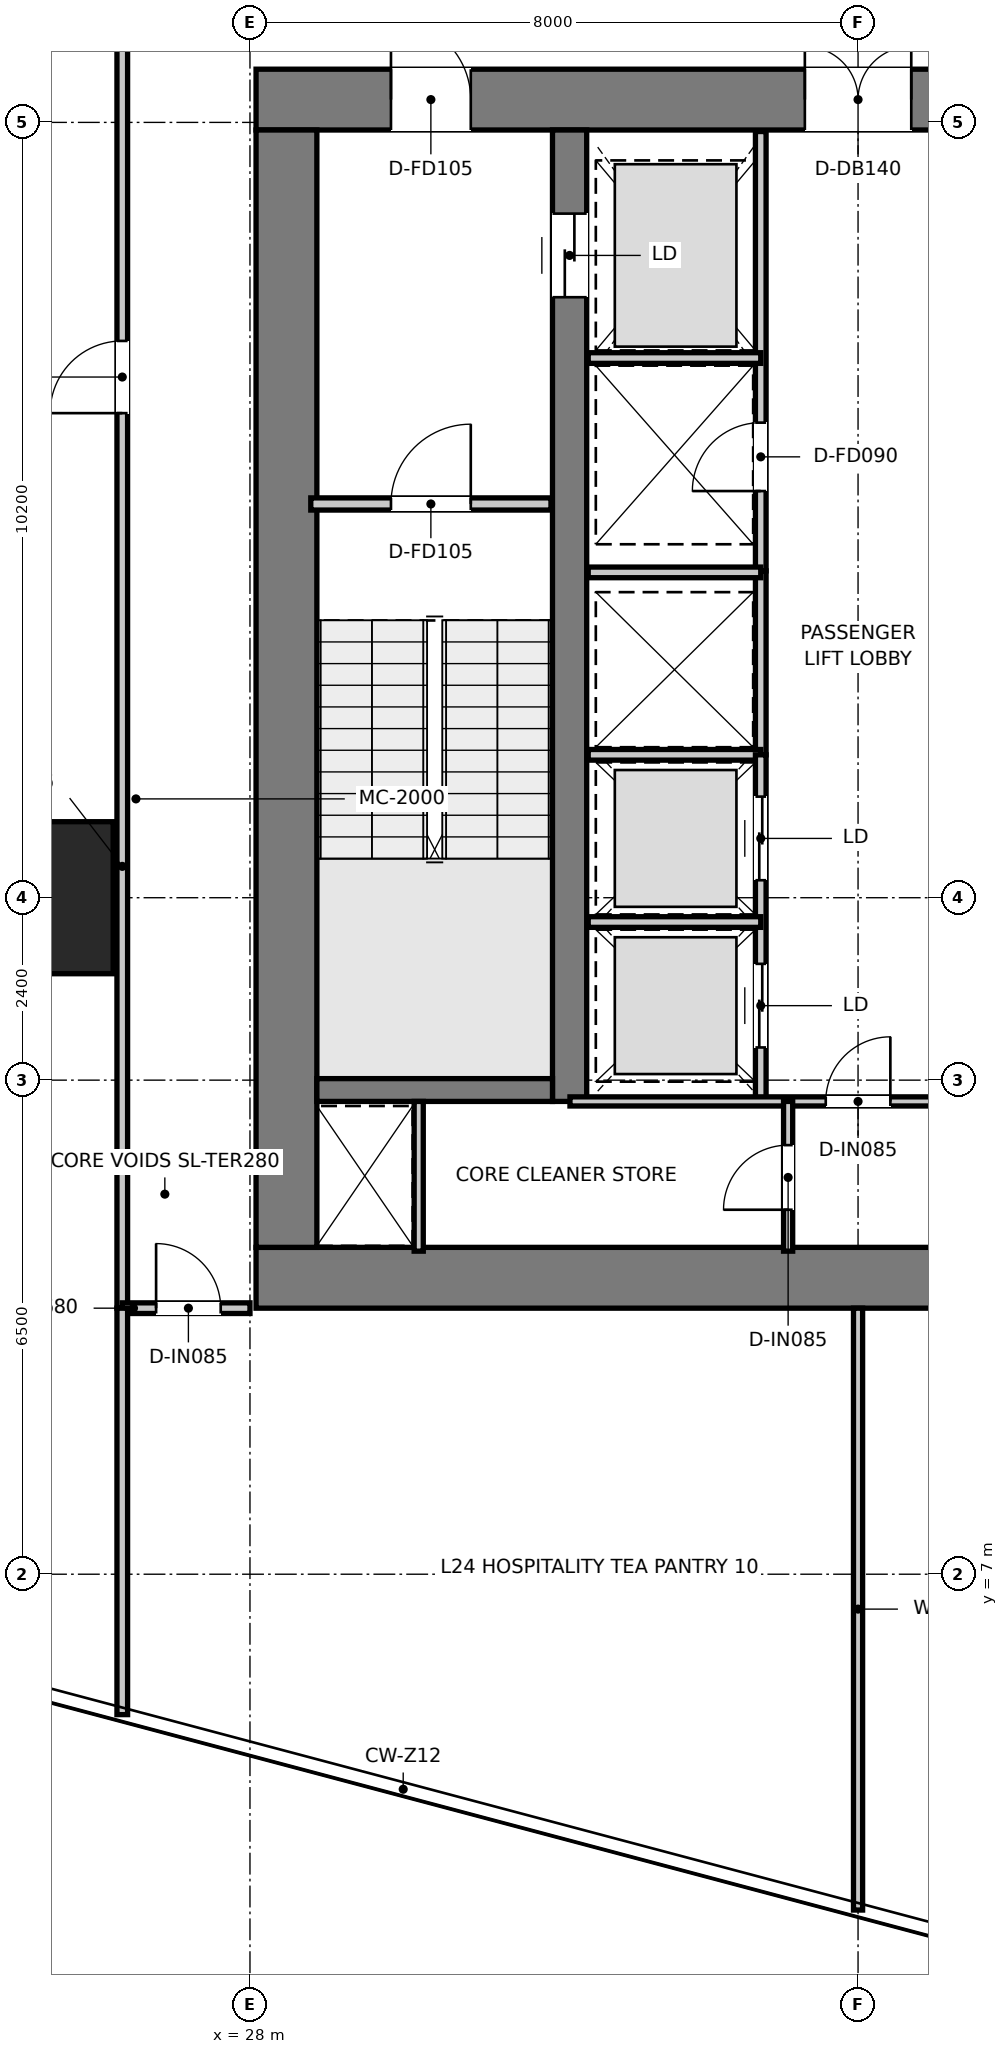
"""IFC4 building model, lengths in metres.
Left out: names, types, materials, properties, quantities, classifications, styles, units other than length and angle.
Written with IfcOpenShell. Run it as: python <this file> out.ifc"""

import sys

from ifc_helpers import new_model, si_unit, direction, frame, frame_2d, origin, origin_2d, place, context, subcontext, project, spatial, rectangle, extrude, source, transform, mapped, element, fill, save


model = new_model("IFC4")
c1 = context("Model", 3, precision=1e-05, world=origin(), true_north=direction((0.0, 1.0)))
c2 = subcontext(c1, "Body", "Model", "MODEL_VIEW")
j1 = project(units=[si_unit("LENGTHUNIT", "METRE"), si_unit("PLANEANGLEUNIT", "RADIAN")], contexts=[c1])
p1 = place(None, origin())
s1 = spatial("IfcSite", under=j1, at=p1, CompositionType="ELEMENT")
p2 = place(p1, origin())
s2 = spatial("IfcBuilding", under=s1, at=p2, CompositionType="ELEMENT")
p3 = place(p2, frame((0.0, 0.0, 101.9)))
s3 = spatial("IfcBuildingStorey", under=s2, at=p3, CompositionType="ELEMENT", Elevation=101.9)
p4 = place(p3, frame((28.08, 10.9, 0.0), z_axis=(0.0, 0.0, 1.0), x_axis=(1.0, 0.0, 0.0)))
e1 = element("IfcWall", 1, at=p4, inside=s3, PredefinedType="SHEAR", context=c2, shape_type="SweptSolid", body=[
    extrude(rectangle(XDim=15.84, YDim=0.8, at=frame_2d((7.92, 0.0))), origin(), (0.0, 0.0, 1.0), 3.95),
])
p5 = place(p3, frame((28.08, 26.4, 0.0), z_axis=(0.0, 0.0, 1.0), x_axis=(1.0, 0.0, 0.0)))
e2 = element("IfcWall", 2, at=p5, inside=s3, PredefinedType="SHEAR", context=c2, shape_type="SweptSolid", body=[
    extrude(rectangle(XDim=15.84, YDim=0.8, at=frame_2d((7.92, 0.0))), origin(), (0.0, 0.0, 1.0), 3.95),
])
p6 = place(p5, frame((7.22, 0.0, 0.0)))
e3 = element("IfcOpeningElement", 3, at=p6, cuts=e2, PredefinedType="OPENING", context=c2, shape_type="SweptSolid", body=[
    extrude(rectangle(XDim=1.4, YDim=2.2, at=frame_2d((0.7, 1.1))), frame((0.0, 0.41, 0.0), z_axis=(0.0, -1.0, 0.0), x_axis=(1.0, 0.0, 0.0)), (0.0, 0.0, 1.0), 0.82),
])
p7 = place(p5, frame((1.775, 0.0, 0.0)))
e4 = element("IfcOpeningElement", 4, at=p7, cuts=e2, PredefinedType="OPENING", context=c2, shape_type="SweptSolid", body=[
    extrude(rectangle(XDim=1.05, YDim=2.1, at=frame_2d((0.525, 1.05))), frame((0.0, 0.41, 0.0), z_axis=(0.0, -1.0, 0.0), x_axis=(1.0, 0.0, 0.0)), (0.0, 0.0, 1.0), 0.82),
])
p8 = place(p5, frame((13.015, 0.0, 0.0)))
e5 = element("IfcOpeningElement", 5, at=p8, cuts=e2, PredefinedType="OPENING", context=c2, shape_type="SweptSolid", body=[
    extrude(rectangle(XDim=1.05, YDim=2.1, at=frame_2d((0.525, 1.05))), frame((0.0, 0.41, 0.0), z_axis=(0.0, -1.0, 0.0), x_axis=(1.0, 0.0, 0.0)), (0.0, 0.0, 1.0), 0.82),
])
p9 = place(p3, frame((28.48, 11.3, 0.0), z_axis=(0.0, 0.0, 1.0), x_axis=(0.0, 1.0, 0.0)))
e6 = element("IfcWall", 6, at=p9, inside=s3, PredefinedType="SHEAR", context=c2, shape_type="SweptSolid", body=[
    extrude(rectangle(XDim=14.7, YDim=0.8, at=frame_2d((7.35, 0.0))), origin(), (0.0, 0.0, 1.0), 3.95),
])
p10 = place(p3, frame((32.205, 13.22, 0.0), z_axis=(0.0, 0.0, 1.0), x_axis=(0.0, 1.0, 0.0)))
e7 = element("IfcWall", 7, at=p10, inside=s3, PredefinedType="SHEAR", context=c2, shape_type="SweptSolid", body=[
    extrude(rectangle(XDim=12.78, YDim=0.45, at=frame_2d((6.39, 0.0))), origin(), (0.0, 0.0, 1.0), 3.95),
])
p11 = place(p10, frame((10.58, 0.0, 0.0)))
e8 = element("IfcOpeningElement", 8, at=p11, cuts=e7, PredefinedType="OPENING", context=c2, shape_type="SweptSolid", body=[
    extrude(rectangle(XDim=1.1, YDim=2.15, at=frame_2d((0.55, 1.075))), frame((0.0, 0.235, 0.0), z_axis=(0.0, -1.0, 0.0), x_axis=(1.0, 0.0, 0.0)), (0.0, 0.0, 1.0), 0.47),
])
p12 = place(p3, frame((28.88, 13.37, 0.0), z_axis=(0.0, 0.0, 1.0), x_axis=(1.0, 0.0, 0.0)))
e9 = element("IfcWall", 9, at=p12, inside=s3, PredefinedType="SHEAR", context=c2, shape_type="SweptSolid", body=[
    extrude(rectangle(XDim=3.1, YDim=0.3, at=frame_2d((1.55, 0.0))), origin(), (0.0, 0.0, 1.0), 3.95),
])
m1 = source(origin(), c2, "Body", "SweptSolid", [
    extrude(rectangle(XDim=2.0, YDim=2.0, at=origin_2d()), origin(), (0.0, 0.0, 1.0), 3.95),
])
p13 = place(p3, frame((25.2, 15.9, 0.0), z_axis=(0.0, 0.0, 1.0), x_axis=(1.0, 0.0, 0.0)))
e10 = element("IfcColumn", 10, at=p13, inside=s3, PredefinedType="USERDEFINED", context=c2, shape_type="MappedRepresentation", body=[
    mapped(m1, transform((0.0, 0.0, 0.0), x_axis=(1.0, 0.0, 0.0), y_axis=(0.0, 1.0, 0.0), z_axis=(0.0, 0.0, 1.0), scale=1.0)),
])
p14 = place(p3, frame((28.8, 21.08, 0.0), z_axis=(0.0, 0.0, 1.0), x_axis=(1.0, 0.0, 0.0)))
e11 = element("IfcWall", 11, at=p14, inside=s3, PredefinedType="PARTITIONING", context=c2, shape_type="SweptSolid", body=[
    extrude(rectangle(XDim=3.16, YDim=0.16, at=frame_2d((1.58, 0.0))), origin(), (0.0, 0.0, 1.0), 3.67),
])
p15 = place(p14, frame((1.055, 0.0, 0.0)))
e12 = element("IfcOpeningElement", 12, at=p15, cuts=e11, PredefinedType="OPENING", context=c2, shape_type="SweptSolid", body=[
    extrude(rectangle(XDim=1.05, YDim=2.1, at=frame_2d((0.525, 1.05))), frame((0.0, 0.09, 0.0), z_axis=(0.0, -1.0, 0.0), x_axis=(1.0, 0.0, 0.0)), (0.0, 0.0, 1.0), 0.18),
])
p16 = place(p3, frame((34.72, 20.2, 0.0), z_axis=(0.0, 0.0, 1.0), x_axis=(0.0, 1.0, 0.0)))
e13 = element("IfcWall", 13, at=p16, inside=s3, PredefinedType="PARTITIONING", context=c2, shape_type="SweptSolid", body=[
    extrude(rectangle(XDim=5.78, YDim=0.14, at=frame_2d((2.89, 0.0))), origin(), (0.0, 0.0, 1.0), 2.67),
])
p17 = place(p16, frame((1.05, 0.0, 0.0)))
e14 = element("IfcOpeningElement", 14, at=p17, cuts=e13, PredefinedType="OPENING", context=c2, shape_type="SweptSolid", body=[
    extrude(rectangle(XDim=0.9, YDim=2.1, at=frame_2d((0.45, 1.05))), frame((0.0, 0.08, 0.0), z_axis=(0.0, -1.0, 0.0), x_axis=(1.0, 0.0, 0.0)), (0.0, 0.0, 1.0), 0.16),
])
p18 = place(p3, frame((32.45, 23.0, 0.0), z_axis=(0.0, 0.0, 1.0), x_axis=(1.0, 0.0, 0.0)))
e15 = element("IfcWall", 15, at=p18, inside=s3, PredefinedType="PARTITIONING", context=c2, shape_type="SweptSolid", body=[
    extrude(rectangle(XDim=2.27, YDim=0.14, at=frame_2d((1.135, 0.0))), origin(), (0.0, 0.0, 1.0), 2.67),
])
p19 = place(p3, frame((34.72, 17.78, 0.0), z_axis=(0.0, 0.0, 1.0), x_axis=(0.0, 1.0, 0.0)))
e16 = element("IfcWall", 16, at=p19, inside=s3, PredefinedType="PARTITIONING", context=c2, shape_type="SweptSolid", body=[
    extrude(rectangle(XDim=2.42, YDim=0.14, at=frame_2d((1.21, 0.0))), origin(), (0.0, 0.0, 1.0), 3.67),
])
for number, where, z_axis, x_axis in (
    (17, (32.45, 17.78, 0.0), (0.0, 0.0, 1.0), (1.0, 0.0, 0.0)),
    (18, (32.45, 20.18, 0.0), (0.0, 0.0, 1.0), (1.0, 0.0, 0.0)),
):
    element("IfcWall", number, at=place(p3, frame(where, z_axis=z_axis, x_axis=x_axis)), inside=s3, PredefinedType="PARTITIONING", context=c2, shape_type="SweptSolid", body=[
        extrude(rectangle(XDim=2.27, YDim=0.14, at=frame_2d((1.135, 0.0))), origin(), (0.0, 0.0, 1.0), 3.67),
    ])
p20 = place(p3, frame((34.72, 13.22, 0.0), z_axis=(0.0, 0.0, 1.0), x_axis=(0.0, 1.0, 0.0)))
e19 = element("IfcWall", 19, at=p20, inside=s3, PredefinedType="PARTITIONING", context=c2, shape_type="SweptSolid", body=[
    extrude(rectangle(XDim=4.56, YDim=0.14, at=frame_2d((2.28, 0.0))), origin(), (0.0, 0.0, 1.0), 3.67),
])
p21 = place(p20, frame((0.71, 0.0, 0.0)))
e20 = element("IfcOpeningElement", 20, at=p21, cuts=e19, PredefinedType="OPENING", context=c2, shape_type="SweptSolid", body=[
    extrude(rectangle(XDim=1.1, YDim=2.15, at=frame_2d((0.55, 1.075))), frame((0.0, 0.08, 0.0), z_axis=(0.0, -1.0, 0.0), x_axis=(1.0, 0.0, 0.0)), (0.0, 0.0, 1.0), 0.16),
])
p22 = place(p20, frame((2.91, 0.0, 0.0)))
e21 = element("IfcOpeningElement", 21, at=p22, cuts=e19, PredefinedType="OPENING", context=c2, shape_type="SweptSolid", body=[
    extrude(rectangle(XDim=1.1, YDim=2.15, at=frame_2d((0.55, 1.075))), frame((0.0, 0.08, 0.0), z_axis=(0.0, -1.0, 0.0), x_axis=(1.0, 0.0, 0.0)), (0.0, 0.0, 1.0), 0.16),
])
p23 = place(p3, frame((32.45, 15.58, 0.0), z_axis=(0.0, 0.0, 1.0), x_axis=(1.0, 0.0, 0.0)))
e22 = element("IfcWall", 22, at=p23, inside=s3, PredefinedType="PARTITIONING", context=c2, shape_type="SweptSolid", body=[
    extrude(rectangle(XDim=2.27, YDim=0.14, at=frame_2d((1.135, 0.0))), origin(), (0.0, 0.0, 1.0), 3.67),
])
p24 = place(p3, frame((30.22, 11.25, 0.0), z_axis=(0.0, 0.0, 1.0), x_axis=(0.0, 1.0, 0.0)))
e23 = element("IfcWall", 23, at=p24, inside=s3, PredefinedType="PARTITIONING", context=c2, shape_type="SweptSolid", body=[
    extrude(rectangle(XDim=1.97, YDim=0.12, at=frame_2d((0.985, 0.0))), origin(), (0.0, 0.0, 1.0), 3.67),
])
p25 = place(p3, frame((32.21, 13.22, 0.0), z_axis=(0.0, 0.0, 1.0), x_axis=(1.0, 0.0, 0.0)))
e24 = element("IfcWall", 24, at=p25, inside=s3, PredefinedType="PARTITIONING", context=c2, shape_type="SweptSolid", body=[
    extrude(rectangle(XDim=7.58, YDim=0.12, at=frame_2d((3.79, 0.0))), origin(), (0.0, 0.0, 1.0), 3.67),
])
p26 = place(p25, frame((3.365, 0.0, 0.0)))
e25 = element("IfcOpeningElement", 25, at=p26, cuts=e24, PredefinedType="OPENING", context=c2, shape_type="SweptSolid", body=[
    extrude(rectangle(XDim=0.85, YDim=2.1, at=frame_2d((0.425, 1.05))), frame((0.0, 0.07, 0.0), z_axis=(0.0, -1.0, 0.0), x_axis=(1.0, 0.0, 0.0)), (0.0, 0.0, 1.0), 0.14),
])
p27 = place(p3, frame((35.08, 11.25, 0.0), z_axis=(0.0, 0.0, 1.0), x_axis=(0.0, 1.0, 0.0)))
e26 = element("IfcWall", 26, at=p27, inside=s3, PredefinedType="PARTITIONING", context=c2, shape_type="SweptSolid", body=[
    extrude(rectangle(XDim=1.97, YDim=0.12, at=frame_2d((0.985, 0.0))), origin(), (0.0, 0.0, 1.0), 3.67),
])
p28 = place(p27, frame((0.545, 0.0, 0.0)))
e27 = element("IfcOpeningElement", 27, at=p28, cuts=e26, PredefinedType="OPENING", context=c2, shape_type="SweptSolid", body=[
    extrude(rectangle(XDim=0.85, YDim=2.1, at=frame_2d((0.425, 1.05))), frame((0.0, 0.07, 0.0), z_axis=(0.0, -1.0, 0.0), x_axis=(1.0, 0.0, 0.0)), (0.0, 0.0, 1.0), 0.14),
])
p29 = place(p3, frame((26.32, 10.5, 0.0), z_axis=(0.0, 0.0, 1.0), x_axis=(0.0, 1.0, 0.0)))
e28 = element("IfcWall", 28, at=p29, inside=s3, PredefinedType="PARTITIONING", context=c2, shape_type="SweptSolid", body=[
    extrude(rectangle(XDim=25.62, YDim=0.14, at=frame_2d((12.81, 0.0))), origin(), (0.0, 0.0, 1.0), 2.97),
])
p30 = place(p29, frame((11.775, 0.0, 0.0)))
e29 = element("IfcOpeningElement", 29, at=p30, cuts=e28, PredefinedType="OPENING", context=c2, shape_type="SweptSolid", body=[
    extrude(rectangle(XDim=0.95, YDim=2.1, at=frame_2d((0.475, 1.05))), frame((0.0, 0.08, 0.0), z_axis=(0.0, -1.0, 0.0), x_axis=(1.0, 0.0, 0.0)), (0.0, 0.0, 1.0), 0.16),
])
p31 = place(p29, frame((20.375, 0.0, 0.0)))
e30 = element("IfcOpeningElement", 30, at=p31, cuts=e28, PredefinedType="OPENING", context=c2, shape_type="SweptSolid", body=[
    extrude(rectangle(XDim=0.95, YDim=2.1, at=frame_2d((0.475, 1.05))), frame((0.0, 0.08, 0.0), z_axis=(0.0, -1.0, 0.0), x_axis=(1.0, 0.0, 0.0)), (0.0, 0.0, 1.0), 0.16),
])
p32 = place(p3, frame((26.32, 10.5, 0.0), z_axis=(0.0, 0.0, 1.0), x_axis=(1.0, 0.0, 0.0)))
e31 = element("IfcWall", 31, at=p32, inside=s3, PredefinedType="PARTITIONING", context=c2, shape_type="SweptSolid", body=[
    extrude(rectangle(XDim=1.68, YDim=0.14, at=frame_2d((0.84, 0.0))), origin(), (0.0, 0.0, 1.0), 3.67),
])
p33 = place(p32, frame((0.445, 0.0, 0.0)))
e32 = element("IfcOpeningElement", 32, at=p33, cuts=e31, PredefinedType="OPENING", context=c2, shape_type="SweptSolid", body=[
    extrude(rectangle(XDim=0.85, YDim=2.1, at=frame_2d((0.425, 1.05))), frame((0.0, 0.08, 0.0), z_axis=(0.0, -1.0, 0.0), x_axis=(1.0, 0.0, 0.0)), (0.0, 0.0, 1.0), 0.16),
])
p34 = place(p3, frame((26.32, 5.153, 0.0), z_axis=(0.0, 0.0, 1.0), x_axis=(0.0, 1.0, 0.0)))
e33 = element("IfcWall", 33, at=p34, inside=s3, PredefinedType="PARTITIONING", context=c2, shape_type="SweptSolid", body=[
    extrude(rectangle(XDim=5.347, YDim=0.14, at=frame_2d((2.674, 0.0))), origin(), (0.0, 0.0, 1.0), 3.67),
])
p35 = place(p3, frame((36.0, 2.582, 0.0), z_axis=(0.0, 0.0, 1.0), x_axis=(0.0, 1.0, 0.0)))
e34 = element("IfcWall", 34, at=p35, inside=s3, PredefinedType="PARTITIONING", context=c2, shape_type="SweptSolid", body=[
    extrude(rectangle(XDim=7.918, YDim=0.12, at=frame_2d((3.959, 0.0))), origin(), (0.0, 0.0, 1.0), 3.67),
])
p36 = place(p15, origin())
e35 = element("IfcDoor", 35, at=p36, inside=s3, OperationType="SINGLE_SWING_RIGHT", PredefinedType="DOOR", context=c2, shape_type="SweptSolid", body=[
    extrude(rectangle(XDim=1.05, YDim=2.1, at=frame_2d((0.525, 1.05))), frame((0.0, 0.025, 0.0), z_axis=(0.0, -1.0, 0.0), x_axis=(1.0, 0.0, 0.0)), (0.0, 0.0, 1.0), 0.05),
])
fill(e12, e35)
p37 = place(p6, origin())
e36 = element("IfcDoor", 36, at=p37, inside=s3, OperationType="DOUBLE_DOOR_SINGLE_SWING", PredefinedType="DOOR", context=c2, shape_type="SweptSolid", body=[
    extrude(rectangle(XDim=1.4, YDim=2.2, at=frame_2d((0.7, 1.1))), frame((0.0, 0.025, 0.0), z_axis=(0.0, -1.0, 0.0), x_axis=(1.0, 0.0, 0.0)), (0.0, 0.0, 1.0), 0.05),
])
fill(e3, e36)
p38 = place(p7, origin())
e37 = element("IfcDoor", 37, at=p38, inside=s3, OperationType="SINGLE_SWING_LEFT", PredefinedType="DOOR", context=c2, shape_type="SweptSolid", body=[
    extrude(rectangle(XDim=1.05, YDim=2.1, at=frame_2d((0.525, 1.05))), frame((0.0, 0.025, 0.0), z_axis=(0.0, -1.0, 0.0), x_axis=(1.0, 0.0, 0.0)), (0.0, 0.0, 1.0), 0.05),
])
fill(e4, e37)
p39 = place(p11, origin())
e38 = element("IfcDoor", 38, at=p39, inside=s3, OperationType="DOUBLE_DOOR_SLIDING", PredefinedType="DOOR", context=c2, shape_type="SweptSolid", body=[
    extrude(rectangle(XDim=1.1, YDim=2.15, at=frame_2d((0.55, 1.075))), frame((0.0, 0.025, 0.0), z_axis=(0.0, -1.0, 0.0), x_axis=(1.0, 0.0, 0.0)), (0.0, 0.0, 1.0), 0.05),
])
fill(e8, e38)
p40 = place(p17, origin())
e39 = element("IfcDoor", 39, at=p40, inside=s3, OperationType="SINGLE_SWING_LEFT", PredefinedType="DOOR", context=c2, shape_type="SweptSolid", body=[
    extrude(rectangle(XDim=0.9, YDim=2.1, at=frame_2d((0.45, 1.05))), frame((0.0, 0.025, 0.0), z_axis=(0.0, -1.0, 0.0), x_axis=(1.0, 0.0, 0.0)), (0.0, 0.0, 1.0), 0.05),
])
fill(e14, e39)
p41 = place(p21, origin())
e40 = element("IfcDoor", 40, at=p41, inside=s3, OperationType="DOUBLE_DOOR_SLIDING", PredefinedType="DOOR", context=c2, shape_type="SweptSolid", body=[
    extrude(rectangle(XDim=1.1, YDim=2.15, at=frame_2d((0.55, 1.075))), frame((0.0, 0.025, 0.0), z_axis=(0.0, -1.0, 0.0), x_axis=(1.0, 0.0, 0.0)), (0.0, 0.0, 1.0), 0.05),
])
fill(e20, e40)
p42 = place(p22, origin())
e41 = element("IfcDoor", 41, at=p42, inside=s3, OperationType="DOUBLE_DOOR_SLIDING", PredefinedType="DOOR", context=c2, shape_type="SweptSolid", body=[
    extrude(rectangle(XDim=1.1, YDim=2.15, at=frame_2d((0.55, 1.075))), frame((0.0, 0.025, 0.0), z_axis=(0.0, -1.0, 0.0), x_axis=(1.0, 0.0, 0.0)), (0.0, 0.0, 1.0), 0.05),
])
fill(e21, e41)
p43 = place(p26, origin())
e42 = element("IfcDoor", 42, at=p43, inside=s3, OperationType="SINGLE_SWING_RIGHT", PredefinedType="DOOR", context=c2, shape_type="SweptSolid", body=[
    extrude(rectangle(XDim=0.85, YDim=2.1, at=frame_2d((0.425, 1.05))), frame((0.0, 0.025, 0.0), z_axis=(0.0, -1.0, 0.0), x_axis=(1.0, 0.0, 0.0)), (0.0, 0.0, 1.0), 0.05),
])
fill(e25, e42)
p44 = place(p28, origin())
e43 = element("IfcDoor", 43, at=p44, inside=s3, OperationType="SINGLE_SWING_LEFT", PredefinedType="DOOR", context=c2, shape_type="SweptSolid", body=[
    extrude(rectangle(XDim=0.85, YDim=2.1, at=frame_2d((0.425, 1.05))), frame((0.0, 0.025, 0.0), z_axis=(0.0, -1.0, 0.0), x_axis=(1.0, 0.0, 0.0)), (0.0, 0.0, 1.0), 0.05),
])
fill(e27, e43)
p45 = place(p30, origin())
e44 = element("IfcDoor", 44, at=p45, inside=s3, OperationType="SINGLE_SWING_LEFT", PredefinedType="DOOR", context=c2, shape_type="SweptSolid", body=[
    extrude(rectangle(XDim=0.95, YDim=2.1, at=frame_2d((0.475, 1.05))), frame((0.0, 0.025, 0.0), z_axis=(0.0, -1.0, 0.0), x_axis=(1.0, 0.0, 0.0)), (0.0, 0.0, 1.0), 0.05),
])
fill(e29, e44)
p46 = place(p33, origin())
e45 = element("IfcDoor", 45, at=p46, inside=s3, OperationType="SINGLE_SWING_LEFT", PredefinedType="DOOR", context=c2, shape_type="SweptSolid", body=[
    extrude(rectangle(XDim=0.85, YDim=2.1, at=frame_2d((0.425, 1.05))), frame((0.0, 0.025, 0.0), z_axis=(0.0, -1.0, 0.0), x_axis=(1.0, 0.0, 0.0)), (0.0, 0.0, 1.0), 0.05),
])
fill(e32, e45)
save(model, sys.argv[1])
